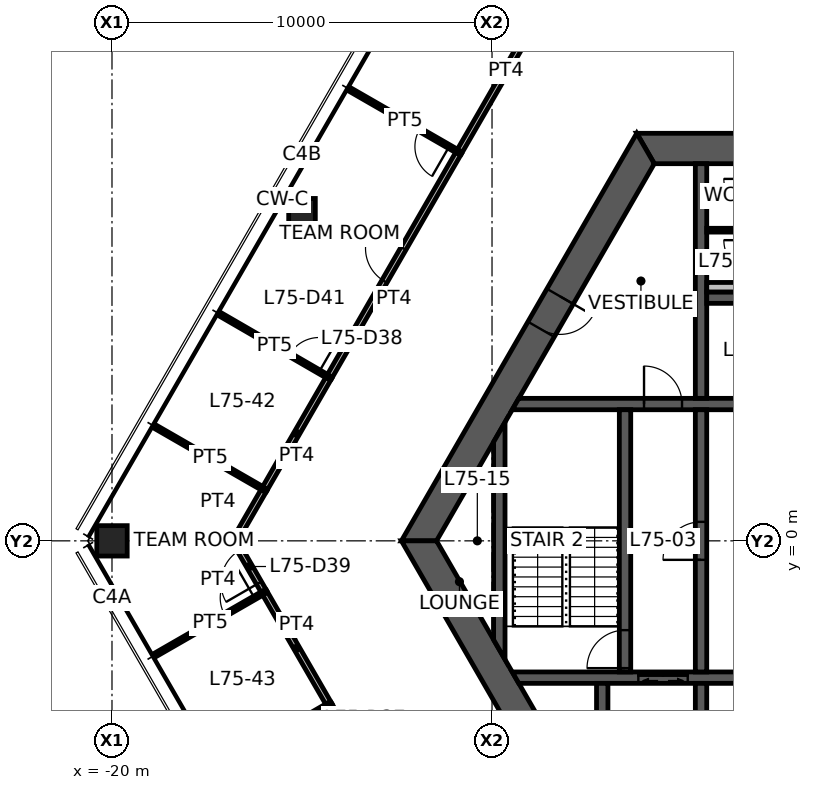
"""IFC4 building model, lengths in metres.
Left out: names, types, materials, properties, quantities, classifications, styles, units other than length and angle.
Written with IfcOpenShell. Run it as: python <this file> out.ifc"""

import sys

from ifc_helpers import new_model, si_unit, direction, frame, frame_2d, origin, origin_2d, place, context, subcontext, project, spatial, polyline, rectangle, hollow_rectangle, outline, extrude, element, fill, save


model = new_model("IFC4")
c1 = context("Model", 3, precision=1e-05, world=origin(), true_north=direction((0.0, 1.0)))
c2 = subcontext(c1, "Body", "Model", "MODEL_VIEW")
j1 = project(units=[si_unit("LENGTHUNIT", "METRE"), si_unit("PLANEANGLEUNIT", "RADIAN")], contexts=[c1])
p1 = place(None, origin())
s1 = spatial("IfcSite", under=j1, at=p1, CompositionType="ELEMENT")
p2 = place(p1, origin())
s2 = spatial("IfcBuilding", under=s1, at=p2, CompositionType="ELEMENT")
p3 = place(p2, frame((0.0, 0.0, 298.6)))
s3 = spatial("IfcBuildingStorey", under=s2, at=p3, CompositionType="ELEMENT", Elevation=298.6)
p4 = place(p3, frame((-20.0, 0.0, 0.0), z_axis=(0.0, 0.0, 1.0), x_axis=(1.0, 0.0, 0.0)))
e1 = element("IfcColumn", 1, at=p4, inside=s3, PredefinedType="COLUMN", context=c2, shape_type="SweptSolid", body=[
    extrude(hollow_rectangle(XDim=0.8, YDim=0.8, WallThickness=0.04, at=origin_2d()), origin(), (0.0, 0.0, 1.0), 3.9),
])
p5 = place(p3, frame((-15.0, 8.66, 0.0), z_axis=(0.0, 0.0, 1.0), x_axis=(1.0, 0.0, 0.0)))
e2 = element("IfcColumn", 2, at=p5, inside=s3, PredefinedType="COLUMN", context=c2, shape_type="SweptSolid", body=[
    extrude(hollow_rectangle(XDim=0.7, YDim=0.7, WallThickness=0.032, at=origin_2d()), origin(), (0.0, 0.0, 1.0), 3.9),
])
p6 = place(p3, frame((5.961, 10.325, 0.0), z_axis=(0.0, 0.0, 1.0), x_axis=(-1.0, 0.0, 0.0)))
e3 = element("IfcWall", 3, at=p6, inside=s3, PredefinedType="SHEAR", context=c2, shape_type="SweptSolid", body=[
    extrude(outline(polyline([(-0.231, -0.4), (4.636, -0.4), (5.536, -0.4), (6.386, -0.4), (7.286, -0.4), (12.153, -0.4), (11.691, 0.4), (7.286, 0.4), (6.386, 0.4), (5.536, 0.4), (4.636, 0.4), (0.231, 0.4), (-0.231, -0.4)])), origin(), (0.0, 0.0, 1.0), 3.9),
])
p7 = place(p6, frame((6.386, 0.0, 0.0)))
e4 = element("IfcOpeningElement", 4, at=p7, cuts=e3, PredefinedType="OPENING", context=c2, shape_type="SweptSolid", body=[
    extrude(rectangle(XDim=0.9, YDim=2.1, at=frame_2d((0.45, 1.05))), frame((0.0, 0.41, 0.0), z_axis=(0.0, -1.0, 0.0), x_axis=(1.0, 0.0, 0.0)), (0.0, 0.0, 1.0), 0.82),
])
p8 = place(p6, frame((4.636, 0.0, 0.0)))
e5 = element("IfcOpeningElement", 5, at=p8, cuts=e3, PredefinedType="OPENING", context=c2, shape_type="SweptSolid", body=[
    extrude(rectangle(XDim=0.9, YDim=2.1, at=frame_2d((0.45, 1.05))), frame((0.0, 0.41, 0.0), z_axis=(0.0, -1.0, 0.0), x_axis=(1.0, 0.0, 0.0)), (0.0, 0.0, 1.0), 0.82),
])
p9 = place(p3, frame((-5.961, 10.325, 0.0), z_axis=(0.0, 0.0, 1.0), x_axis=(-0.500004296715, -0.866022923061, 0.0)))
e6 = element("IfcWall", 6, at=p9, inside=s3, PredefinedType="SHEAR", context=c2, shape_type="SweptSolid", body=[
    extrude(outline(polyline([(-0.231, -0.4), (4.494, -0.4), (5.494, -0.4), (12.153, -0.4), (11.691, 0.4), (5.494, 0.4), (4.494, 0.4), (0.231, 0.4), (-0.231, -0.4)])), origin(), (0.0, 0.0, 1.0), 3.9),
])
p10 = place(p9, frame((4.494, 0.0, 0.0)))
e7 = element("IfcOpeningElement", 7, at=p10, cuts=e6, PredefinedType="OPENING", context=c2, shape_type="SweptSolid", body=[
    extrude(rectangle(XDim=1.0, YDim=2.1, at=frame_2d((0.5, 1.05))), frame((0.0, 0.41, 0.0), z_axis=(0.0, -1.0, 0.0), x_axis=(1.0, 0.0, 0.0)), (0.0, 0.0, 1.0), 0.82),
])
p11 = place(p3, frame((-11.922, 0.0, 0.0), z_axis=(0.0, 0.0, 1.0), x_axis=(0.500004296715, -0.866022923061, 0.0)))
e8 = element("IfcWall", 8, at=p11, inside=s3, PredefinedType="SHEAR", context=c2, shape_type="SweptSolid", body=[
    extrude(outline(polyline([(-0.231, -0.4), (6.281, -0.4), (7.081, -0.4), (12.153, -0.4), (11.691, 0.4), (7.081, 0.4), (6.281, 0.4), (0.231, 0.4), (-0.231, -0.4)])), origin(), (0.0, 0.0, 1.0), 3.9),
])
p12 = place(p11, frame((6.281, 0.0, 0.0)))
e9 = element("IfcOpeningElement", 9, at=p12, cuts=e8, PredefinedType="OPENING", context=c2, shape_type="SweptSolid", body=[
    extrude(rectangle(XDim=0.8, YDim=2.1, at=frame_2d((0.4, 1.05))), frame((0.0, 0.41, 0.0), z_axis=(0.0, -1.0, 0.0), x_axis=(1.0, 0.0, 0.0)), (0.0, 0.0, 1.0), 0.82),
])
p13 = place(p3, frame((-9.382, 3.6, 0.0), z_axis=(0.0, 0.0, 1.0), x_axis=(1.0, 0.0, 0.0)))
e10 = element("IfcWall", 10, at=p13, inside=s3, PredefinedType="SHEAR", context=c2, shape_type="SweptSolid", body=[
    extrude(outline(polyline([(-0.087, -0.15), (3.382, -0.15), (4.382, -0.15), (5.782, -0.15), (6.882, -0.15), (7.932, -0.15), (7.932, 0.15), (6.882, 0.15), (5.782, 0.15), (4.382, 0.15), (3.382, 0.15), (0.087, 0.15), (-0.087, -0.15)])), origin(), (0.0, 0.0, 1.0), 3.9),
])
p14 = place(p13, frame((3.382, 0.0, 0.0)))
e11 = element("IfcOpeningElement", 11, at=p14, cuts=e10, PredefinedType="OPENING", context=c2, shape_type="SweptSolid", body=[
    extrude(rectangle(XDim=1.0, YDim=2.1, at=frame_2d((0.5, 1.05))), frame((0.0, 0.16, 0.0), z_axis=(0.0, -1.0, 0.0), x_axis=(1.0, 0.0, 0.0)), (0.0, 0.0, 1.0), 0.32),
])
p15 = place(p13, frame((5.782, 0.0, 0.0)))
e12 = element("IfcOpeningElement", 12, at=p15, cuts=e10, PredefinedType="OPENING", context=c2, shape_type="SweptSolid", body=[
    extrude(rectangle(XDim=1.1, YDim=2.1, at=frame_2d((0.55, 1.05))), frame((0.0, 0.16, 0.0), z_axis=(0.0, -1.0, 0.0), x_axis=(1.0, 0.0, 0.0)), (0.0, 0.0, 1.0), 0.32),
])
p16 = place(p3, frame((-9.382, -3.6, 0.0), z_axis=(0.0, 0.0, 1.0), x_axis=(1.0, 0.0, 0.0)))
e13 = element("IfcWall", 13, at=p16, inside=s3, PredefinedType="SHEAR", context=c2, shape_type="SweptSolid", body=[
    extrude(outline(polyline([(0.087, -0.15), (3.232, -0.15), (4.532, -0.15), (5.782, -0.15), (6.882, -0.15), (7.932, -0.15), (7.932, 0.15), (6.882, 0.15), (5.782, 0.15), (4.532, 0.15), (3.232, 0.15), (-0.087, 0.15), (0.087, -0.15)])), origin(), (0.0, 0.0, 1.0), 3.9),
])
p17 = place(p16, frame((5.782, 0.0, 0.0)))
e14 = element("IfcOpeningElement", 14, at=p17, cuts=e13, PredefinedType="OPENING", context=c2, shape_type="SweptSolid", body=[
    extrude(rectangle(XDim=1.1, YDim=2.1, at=frame_2d((0.55, 1.05))), frame((0.0, 0.16, 0.0), z_axis=(0.0, -1.0, 0.0), x_axis=(1.0, 0.0, 0.0)), (0.0, 0.0, 1.0), 0.32),
])
p18 = place(p16, frame((3.232, 0.0, 0.0)))
e15 = element("IfcOpeningElement", 15, at=p18, cuts=e13, PredefinedType="OPENING", context=c2, shape_type="SweptSolid", body=[
    extrude(rectangle(XDim=1.3, YDim=2.1, at=frame_2d((0.65, 1.05))), frame((0.0, 0.16, 0.0), z_axis=(0.0, -1.0, 0.0), x_axis=(1.0, 0.0, 0.0)), (0.0, 0.0, 1.0), 0.32),
])
p19 = place(p3, frame((-4.5, -3.45, 0.0), z_axis=(0.0, 0.0, 1.0), x_axis=(0.0, 1.0, 0.0)))
e16 = element("IfcWall", 16, at=p19, inside=s3, PredefinedType="SHEAR", context=c2, shape_type="SweptSolid", body=[
    extrude(rectangle(XDim=6.9, YDim=0.3, at=frame_2d((3.45, 0.0))), origin(), (0.0, 0.0, 1.0), 3.9),
])
p20 = place(p19, frame((2.95, 0.0, 0.0)))
e17 = element("IfcOpeningElement", 17, at=p20, cuts=e16, PredefinedType="OPENING", context=c2, shape_type="SweptSolid", body=[
    extrude(rectangle(XDim=1.0, YDim=2.1, at=frame_2d((0.5, 1.05))), frame((0.0, 0.16, 0.0), z_axis=(0.0, -1.0, 0.0), x_axis=(1.0, 0.0, 0.0)), (0.0, 0.0, 1.0), 0.32),
])
p21 = place(p3, frame((-6.5, -3.45, 0.0), z_axis=(0.0, 0.0, 1.0), x_axis=(0.0, 1.0, 0.0)))
e18 = element("IfcWall", 18, at=p21, inside=s3, PredefinedType="SHEAR", context=c2, shape_type="SweptSolid", body=[
    extrude(rectangle(XDim=6.9, YDim=0.3, at=frame_2d((3.45, 0.0))), origin(), (0.0, 0.0, 1.0), 3.9),
])
p22 = place(p21, frame((0.1, 0.0, 0.0)))
e19 = element("IfcOpeningElement", 19, at=p22, cuts=e18, PredefinedType="OPENING", context=c2, shape_type="SweptSolid", body=[
    extrude(rectangle(XDim=1.0, YDim=2.1, at=frame_2d((0.5, 1.05))), frame((0.0, 0.16, 0.0), z_axis=(0.0, -1.0, 0.0), x_axis=(1.0, 0.0, 0.0)), (0.0, 0.0, 1.0), 0.32),
])
for number, where, z_axis, x_axis in (
    (20, (-4.5, 3.75, 0.0), (0.0, 0.0, 1.0), (0.0, 1.0, 0.0)),
    (21, (-4.5, -3.75, 0.0), (0.0, 0.0, 1.0), (0.0, -1.0, 0.0)),
):
    element("IfcWall", number, at=place(p3, frame(where, z_axis=z_axis, x_axis=x_axis)), inside=s3, PredefinedType="SHEAR", context=c2, shape_type="SweptSolid", body=[
        extrude(rectangle(XDim=6.175, YDim=0.3, at=frame_2d((3.087, 0.0))), origin(), (0.0, 0.0, 1.0), 3.9),
    ])
p23 = place(p3, frame((-4.35, 6.4, 0.0), z_axis=(0.0, 0.0, 1.0), x_axis=(1.0, 0.0, 0.0)))
e22 = element("IfcWall", 22, at=p23, inside=s3, PredefinedType="SHEAR", context=c2, shape_type="SweptSolid", body=[
    extrude(rectangle(XDim=2.6, YDim=0.3, at=frame_2d((1.3, 0.0))), origin(), (0.0, 0.0, 1.0), 3.9),
])
p24 = place(p3, frame((-7.1, -3.75, 0.0), z_axis=(0.0, 0.0, 1.0), x_axis=(0.0, -1.0, 0.0)))
e23 = element("IfcWall", 23, at=p24, inside=s3, PredefinedType="SHEAR", context=c2, shape_type="SweptSolid", body=[
    extrude(rectangle(XDim=3.1, YDim=0.3, at=frame_2d((1.55, 0.0))), origin(), (0.0, 0.0, 1.0), 3.9),
])
p25 = place(p3, frame((-9.808, -2.862, 0.0), z_axis=(0.0, 0.0, 1.0), x_axis=(0.0, 1.0, 0.0)))
e24 = element("IfcWall", 24, at=p25, inside=s3, PredefinedType="SHEAR", context=c2, shape_type="SweptSolid", body=[
    extrude(outline(polyline([(-0.26, -0.15), (5.984, -0.15), (5.465, 0.15), (0.26, 0.15), (-0.26, -0.15)])), origin(), (0.0, 0.0, 1.0), 3.9),
])
p26 = place(p3, frame((-4.35, 6.675, 0.0), z_axis=(0.0, 0.0, 1.0), x_axis=(1.0, 0.0, 0.0)))
e25 = element("IfcWall", 25, at=p26, inside=s3, PredefinedType="PLUMBINGWALL", context=c2, shape_type="SweptSolid", body=[
    extrude(rectangle(XDim=2.6, YDim=0.25, at=frame_2d((1.3, 0.0))), origin(), (0.0, 0.0, 1.0), 3.9),
])
p27 = place(p3, frame((-3.05, 8.175, 0.0), z_axis=(0.0, 0.0, 1.0), x_axis=(-1.0, 0.0, 0.0)))
e26 = element("IfcWall", 26, at=p27, inside=s3, PredefinedType="PARTITIONING", context=c2, shape_type="SweptSolid", body=[
    extrude(rectangle(XDim=1.3, YDim=0.1, at=frame_2d((0.65, 0.0))), origin(), (0.0, 0.0, 1.0), 2.35),
])
p28 = place(p3, frame((-10.874, 10.216, 0.0), z_axis=(0.0, 0.0, 1.0), x_axis=(0.499988457423, 0.866032067792, 0.0)))
e27 = element("IfcWall", 27, at=p28, inside=s3, PredefinedType="PARTITIONING", context=c2, shape_type="SweptSolid", body=[
    extrude(rectangle(XDim=4.952, YDim=0.15, at=frame_2d((2.476, 0.0))), origin(), (0.0, 0.0, 1.0), 2.35),
])
for number, where, z_axis, x_axis in (
    (28, (-15.997, 1.342, 0.0), (0.0, 0.0, 1.0), (0.5, 0.866, 0.0)),
    (29, (-14.284, -4.309, 0.0), (0.0, 0.0, 1.0), (-0.5, 0.866, 0.0)),
):
    element("IfcWall", number, at=place(p3, frame(where, z_axis=z_axis, x_axis=x_axis)), inside=s3, PredefinedType="PARTITIONING", context=c2, shape_type="SweptSolid", body=[
        extrude(rectangle(XDim=3.426, YDim=0.15, at=frame_2d((1.713, 0.0))), origin(), (0.0, 0.0, 1.0), 2.35),
    ])
p29 = place(p3, frame((-12.739, -6.985, 0.0), z_axis=(0.0, 0.0, 1.0), x_axis=(-0.500017819788, 0.86601511528, 0.0)))
e30 = element("IfcWall", 30, at=p29, inside=s3, PredefinedType="PARTITIONING", context=c2, shape_type="SweptSolid", body=[
    extrude(rectangle(XDim=3.101, YDim=0.15, at=frame_2d((1.55, 0.0))), origin(), (0.0, 0.0, 1.0), 2.35),
])
p30 = place(p29, frame((0.3, 0.0, 0.0)))
e31 = element("IfcOpeningElement", 31, at=p30, cuts=e30, PredefinedType="OPENING", context=c2, shape_type="SweptSolid", body=[
    extrude(rectangle(XDim=0.9, YDim=2.1, at=frame_2d((0.45, 1.05))), frame((0.0, 0.085, 0.0), z_axis=(0.0, -1.0, 0.0), x_axis=(1.0, 0.0, 0.0)), (0.0, 0.0, 1.0), 0.17),
])
p31 = place(p3, frame((-14.289, 4.301, 0.0), z_axis=(0.0, 0.0, 1.0), x_axis=(0.500020088259, 0.866013805512, 0.0)))
e32 = element("IfcWall", 32, at=p31, inside=s3, PredefinedType="PARTITIONING", context=c2, shape_type="SweptSolid", body=[
    extrude(rectangle(XDim=6.84, YDim=0.15, at=frame_2d((3.42, 0.0))), origin(), (0.0, 0.0, 1.0), 2.35),
])
p32 = place(p31, frame((2.92, 0.0, 0.0)))
e33 = element("IfcOpeningElement", 33, at=p32, cuts=e32, PredefinedType="OPENING", context=c2, shape_type="SweptSolid", body=[
    extrude(rectangle(XDim=1.0, YDim=2.1, at=frame_2d((0.5, 1.05))), frame((0.0, 0.085, 0.0), z_axis=(0.0, -1.0, 0.0), x_axis=(1.0, 0.0, 0.0)), (0.0, 0.0, 1.0), 0.17),
])
p33 = place(p3, frame((-16.772, 0.0, 0.0), z_axis=(0.0, 0.0, 1.0), x_axis=(0.500011542666, 0.866018739521, 0.0)))
e34 = element("IfcWall", 34, at=p33, inside=s3, PredefinedType="PARTITIONING", context=c2, shape_type="SweptSolid", body=[
    extrude(rectangle(XDim=1.56, YDim=0.15, at=frame_2d((0.78, 0.0))), origin(), (0.0, 0.0, 1.0), 2.35),
])
p34 = place(p3, frame((-15.992, -1.351, 0.0), z_axis=(0.0, 0.0, 1.0), x_axis=(-0.500011542666, 0.866018739521, 0.0)))
e35 = element("IfcWall", 35, at=p34, inside=s3, PredefinedType="PARTITIONING", context=c2, shape_type="SweptSolid", body=[
    extrude(rectangle(XDim=1.56, YDim=0.15, at=frame_2d((0.78, 0.0))), origin(), (0.0, 0.0, 1.0), 2.35),
])
p35 = place(p34, frame((0.28, 0.0, 0.0)))
e36 = element("IfcOpeningElement", 36, at=p35, cuts=e35, PredefinedType="OPENING", context=c2, shape_type="SweptSolid", body=[
    extrude(rectangle(XDim=1.0, YDim=2.1, at=frame_2d((0.5, 1.05))), frame((0.0, 0.085, 0.0), z_axis=(0.0, -1.0, 0.0), x_axis=(1.0, 0.0, 0.0)), (0.0, 0.0, 1.0), 0.17),
])
p36 = place(p3, frame((-10.869, 10.224, 0.0), z_axis=(0.0, 0.0, 1.0), x_axis=(-0.866757761015, 0.498729369218, 0.0)))
e37 = element("IfcWall", 37, at=p36, inside=s3, PredefinedType="PARTITIONING", context=c2, shape_type="SweptSolid", body=[
    extrude(rectangle(XDim=3.286, YDim=0.1, at=frame_2d((1.643, 0.0))), origin(), (0.0, 0.0, 1.0), 2.35),
])
p37 = place(p36, frame((0.3, 0.0, 0.0)))
e38 = element("IfcOpeningElement", 38, at=p37, cuts=e37, PredefinedType="OPENING", context=c2, shape_type="SweptSolid", body=[
    extrude(rectangle(XDim=0.9, YDim=2.1, at=frame_2d((0.45, 1.05))), frame((0.0, 0.06, 0.0), z_axis=(0.0, -1.0, 0.0), x_axis=(1.0, 0.0, 0.0)), (0.0, 0.0, 1.0), 0.12),
])
p38 = place(p3, frame((-17.154, 5.96, 0.0), z_axis=(0.0, 0.0, 1.0), x_axis=(0.865342122637, -0.501181614577, 0.0)))
e39 = element("IfcWall", 39, at=p38, inside=s3, PredefinedType="PARTITIONING", context=c2, shape_type="SweptSolid", body=[
    extrude(rectangle(XDim=3.311, YDim=0.1, at=frame_2d((1.655, 0.0))), origin(), (0.0, 0.0, 1.0), 2.35),
])
p39 = place(p38, frame((2.111, 0.0, 0.0)))
e40 = element("IfcOpeningElement", 40, at=p39, cuts=e39, PredefinedType="OPENING", context=c2, shape_type="SweptSolid", body=[
    extrude(rectangle(XDim=0.9, YDim=2.1, at=frame_2d((0.45, 1.05))), frame((0.0, 0.06, 0.0), z_axis=(0.0, -1.0, 0.0), x_axis=(1.0, 0.0, 0.0)), (0.0, 0.0, 1.0), 0.12),
])
p40 = place(p3, frame((-15.992, 1.351, 0.0), z_axis=(0.0, 0.0, 1.0), x_axis=(-0.866707153418, 0.498817311462, 0.0)))
e41 = element("IfcWall", 41, at=p40, inside=s3, PredefinedType="PARTITIONING", context=c2, shape_type="SweptSolid", body=[
    extrude(rectangle(XDim=3.286, YDim=0.1, at=frame_2d((1.643, 0.0))), origin(), (0.0, 0.0, 1.0), 2.35),
])
p41 = place(p3, frame((-14.289, -4.3, 0.0), z_axis=(0.0, 0.0, 1.0), x_axis=(-0.865245913684, -0.501347692578, 0.0)))
e42 = element("IfcWall", 42, at=p41, inside=s3, PredefinedType="PARTITIONING", context=c2, shape_type="SweptSolid", body=[
    extrude(rectangle(XDim=3.275, YDim=0.1, at=frame_2d((1.638, 0.0))), origin(), (0.0, 0.0, 1.0), 2.35),
])
p42 = place(p3, frame((-18.84, -2.99, 0.0), z_axis=(0.0, 0.0, 1.0), x_axis=(0.866707153418, 0.498817311462, 0.0)))
e43 = element("IfcWall", 43, at=p42, inside=s3, PredefinedType="PARTITIONING", context=c2, shape_type="SweptSolid", body=[
    extrude(rectangle(XDim=3.286, YDim=0.1, at=frame_2d((1.643, 0.0))), origin(), (0.0, 0.0, 1.0), 2.35),
])
p43 = place(p42, frame((2.086, 0.0, 0.0)))
e44 = element("IfcOpeningElement", 44, at=p43, cuts=e43, PredefinedType="OPENING", context=c2, shape_type="SweptSolid", body=[
    extrude(rectangle(XDim=0.9, YDim=2.1, at=frame_2d((0.45, 1.05))), frame((0.0, 0.06, 0.0), z_axis=(0.0, -1.0, 0.0), x_axis=(1.0, 0.0, 0.0)), (0.0, 0.0, 1.0), 0.12),
])
p44 = place(p10, origin())
e45 = element("IfcDoor", 45, at=p44, inside=s3, OperationType="SINGLE_SWING_LEFT", PredefinedType="DOOR", context=c2, shape_type="SweptSolid", body=[
    extrude(rectangle(XDim=1.0, YDim=2.1, at=frame_2d((0.5, 1.05))), frame((0.0, 0.025, 0.0), z_axis=(0.0, -1.0, 0.0), x_axis=(1.0, 0.0, 0.0)), (0.0, 0.0, 1.0), 0.05),
])
fill(e7, e45)
p45 = place(p20, origin())
e46 = element("IfcDoor", 46, at=p45, inside=s3, OperationType="SINGLE_SWING_LEFT", PredefinedType="DOOR", context=c2, shape_type="SweptSolid", body=[
    extrude(rectangle(XDim=1.0, YDim=2.1, at=frame_2d((0.5, 1.05))), frame((0.0, 0.025, 0.0), z_axis=(0.0, -1.0, 0.0), x_axis=(1.0, 0.0, 0.0)), (0.0, 0.0, 1.0), 0.05),
])
fill(e17, e46)
p46 = place(p22, origin())
e47 = element("IfcDoor", 47, at=p46, inside=s3, OperationType="SINGLE_SWING_LEFT", PredefinedType="DOOR", context=c2, shape_type="SweptSolid", body=[
    extrude(rectangle(XDim=1.0, YDim=2.1, at=frame_2d((0.5, 1.05))), frame((0.0, 0.025, 0.0), z_axis=(0.0, -1.0, 0.0), x_axis=(1.0, 0.0, 0.0)), (0.0, 0.0, 1.0), 0.05),
])
fill(e19, e47)
p47 = place(p14, origin())
e48 = element("IfcDoor", 48, at=p47, inside=s3, OperationType="SINGLE_SWING_LEFT", PredefinedType="DOOR", context=c2, shape_type="SweptSolid", body=[
    extrude(rectangle(XDim=1.0, YDim=2.1, at=frame_2d((0.5, 1.05))), frame((0.0, 0.025, 0.0), z_axis=(0.0, -1.0, 0.0), x_axis=(1.0, 0.0, 0.0)), (0.0, 0.0, 1.0), 0.05),
])
fill(e11, e48)
p48 = place(p32, origin())
e49 = element("IfcDoor", 49, at=p48, inside=s3, OperationType="SINGLE_SWING_RIGHT", PredefinedType="DOOR", context=c2, shape_type="SweptSolid", body=[
    extrude(rectangle(XDim=1.0, YDim=2.1, at=frame_2d((0.5, 1.05))), frame((0.0, 0.025, 0.0), z_axis=(0.0, -1.0, 0.0), x_axis=(1.0, 0.0, 0.0)), (0.0, 0.0, 1.0), 0.05),
])
fill(e33, e49)
p49 = place(p35, origin())
e50 = element("IfcDoor", 50, at=p49, inside=s3, OperationType="SINGLE_SWING_LEFT", PredefinedType="DOOR", context=c2, shape_type="SweptSolid", body=[
    extrude(rectangle(XDim=1.0, YDim=2.1, at=frame_2d((0.5, 1.05))), frame((0.0, 0.025, 0.0), z_axis=(0.0, -1.0, 0.0), x_axis=(1.0, 0.0, 0.0)), (0.0, 0.0, 1.0), 0.05),
])
fill(e36, e50)
p50 = place(p37, origin())
e51 = element("IfcDoor", 51, at=p50, inside=s3, OperationType="SINGLE_SWING_LEFT", PredefinedType="DOOR", context=c2, shape_type="SweptSolid", body=[
    extrude(rectangle(XDim=0.9, YDim=2.1, at=frame_2d((0.45, 1.05))), frame((0.0, 0.025, 0.0), z_axis=(0.0, -1.0, 0.0), x_axis=(1.0, 0.0, 0.0)), (0.0, 0.0, 1.0), 0.05),
])
fill(e38, e51)
p51 = place(p39, origin())
e52 = element("IfcDoor", 52, at=p51, inside=s3, OperationType="SINGLE_SWING_RIGHT", PredefinedType="DOOR", context=c2, shape_type="SweptSolid", body=[
    extrude(rectangle(XDim=0.9, YDim=2.1, at=frame_2d((0.45, 1.05))), frame((0.0, 0.025, 0.0), z_axis=(0.0, -1.0, 0.0), x_axis=(1.0, 0.0, 0.0)), (0.0, 0.0, 1.0), 0.05),
])
fill(e40, e52)
p52 = place(p43, origin())
e53 = element("IfcDoor", 53, at=p52, inside=s3, OperationType="SINGLE_SWING_RIGHT", PredefinedType="DOOR", context=c2, shape_type="SweptSolid", body=[
    extrude(rectangle(XDim=0.9, YDim=2.1, at=frame_2d((0.45, 1.05))), frame((0.0, 0.025, 0.0), z_axis=(0.0, -1.0, 0.0), x_axis=(1.0, 0.0, 0.0)), (0.0, 0.0, 1.0), 0.05),
])
fill(e44, e53)
p53 = place(p18, origin())
e54 = element("IfcDoor", 54, at=p53, inside=s3, OperationType="DOUBLE_DOOR_SLIDING", PredefinedType="DOOR", context=c2, shape_type="SweptSolid", body=[
    extrude(rectangle(XDim=1.3, YDim=2.1, at=frame_2d((0.65, 1.05))), frame((0.0, 0.025, 0.0), z_axis=(0.0, -1.0, 0.0), x_axis=(1.0, 0.0, 0.0)), (0.0, 0.0, 1.0), 0.05),
])
fill(e15, e54)
save(model, sys.argv[1])
